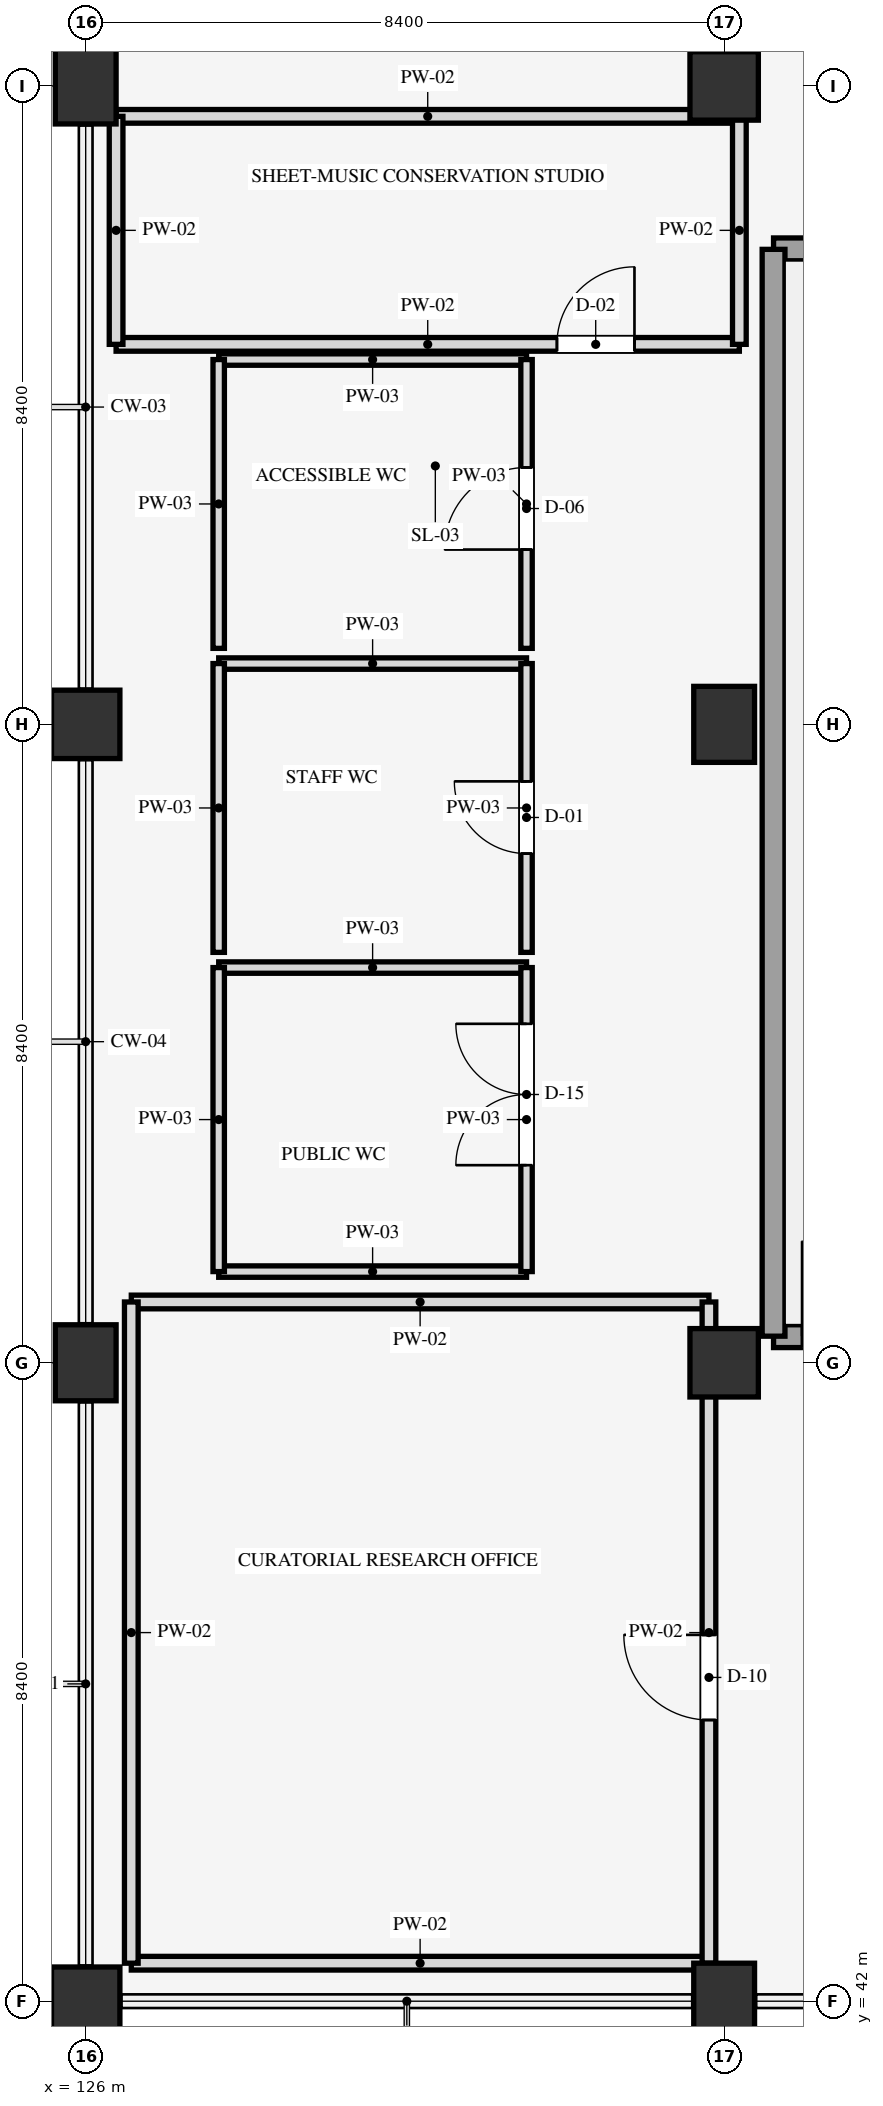
"""IFC4 building model, lengths in metres.
Left out: names, types, materials, properties, quantities, classifications, styles, units other than length and angle.
Written with IfcOpenShell. Run it as: python <this file> out.ifc"""

import sys

from ifc_helpers import new_model, si_unit, direction, frame, frame_2d, origin, origin_2d, place, context, subcontext, project, spatial, rectangle, extrude, element, fill, save


model = new_model("IFC4")
c1 = context("Model", 3, precision=1e-05, world=origin(), true_north=direction((0.0, 1.0)))
c2 = subcontext(c1, "Body", "Model", "MODEL_VIEW")
j1 = project(units=[si_unit("LENGTHUNIT", "METRE"), si_unit("PLANEANGLEUNIT", "RADIAN")], contexts=[c1])
p1 = place(None, origin())
s1 = spatial("IfcSite", under=j1, at=p1, CompositionType="ELEMENT")
p2 = place(p1, origin())
s2 = spatial("IfcBuilding", under=s1, at=p2, CompositionType="ELEMENT")
p3 = place(p2, frame((0.0, 0.0, 65.7)))
s3 = spatial("IfcBuildingStorey", under=s2, at=p3, CompositionType="ELEMENT", Elevation=65.7)
p4 = place(p3, frame((126.0, 42.0, 0.0), z_axis=(0.0, 0.0, 1.0), x_axis=(1.0, 0.0, 0.0)))
e1 = element("IfcColumn", 1, at=p4, inside=s3, PredefinedType="COLUMN", context=c2, shape_type="SweptSolid", body=[
    extrude(rectangle(XDim=0.9, YDim=0.9, at=origin_2d()), origin(), (0.0, 0.0, 1.0), 4.2),
])
p5 = place(p3, frame((126.0, 50.4, 0.0), z_axis=(0.0, 0.0, 1.0), x_axis=(1.0, 0.0, 0.0)))
e2 = element("IfcColumn", 2, at=p5, inside=s3, PredefinedType="COLUMN", context=c2, shape_type="SweptSolid", body=[
    extrude(rectangle(XDim=0.8, YDim=1.0, at=origin_2d()), origin(), (0.0, 0.0, 1.0), 4.2),
])
p6 = place(p3, frame((126.0, 58.8, 0.0), z_axis=(0.0, 0.0, 1.0), x_axis=(1.0, 0.0, 0.0)))
e3 = element("IfcColumn", 3, at=p6, inside=s3, PredefinedType="COLUMN", context=c2, shape_type="SweptSolid", body=[
    extrude(rectangle(XDim=0.9, YDim=0.9, at=origin_2d()), origin(), (0.0, 0.0, 1.0), 4.2),
])
for number, where, z_axis, x_axis in (
    (4, (126.0, 67.2, 0.0), (0.0, 0.0, 1.0), (1.0, 0.0, 0.0)),
    (5, (134.4, 42.0, 0.0), (0.0, 0.0, 1.0), (1.0, 0.0, 0.0)),
):
    element("IfcColumn", number, at=place(p3, frame(where, z_axis=z_axis, x_axis=x_axis)), inside=s3, PredefinedType="COLUMN", context=c2, shape_type="SweptSolid", body=[
        extrude(rectangle(XDim=0.8, YDim=1.0, at=origin_2d()), origin(), (0.0, 0.0, 1.0), 4.2),
    ])
p7 = place(p3, frame((134.4, 50.4, 0.0), z_axis=(0.0, 0.0, 1.0), x_axis=(1.0, 0.0, 0.0)))
e6 = element("IfcColumn", 6, at=p7, inside=s3, PredefinedType="COLUMN", context=c2, shape_type="SweptSolid", body=[
    extrude(rectangle(XDim=0.9, YDim=0.9, at=origin_2d()), origin(), (0.0, 0.0, 1.0), 4.2),
])
p8 = place(p3, frame((134.4, 58.8, 0.0), z_axis=(0.0, 0.0, 1.0), x_axis=(1.0, 0.0, 0.0)))
e7 = element("IfcColumn", 7, at=p8, inside=s3, PredefinedType="COLUMN", context=c2, shape_type="SweptSolid", body=[
    extrude(rectangle(XDim=0.8, YDim=1.0, at=origin_2d()), origin(), (0.0, 0.0, 1.0), 4.2),
])
p9 = place(p3, frame((134.4, 67.2, 0.0), z_axis=(0.0, 0.0, 1.0), x_axis=(1.0, 0.0, 0.0)))
e8 = element("IfcColumn", 8, at=p9, inside=s3, PredefinedType="COLUMN", context=c2, shape_type="SweptSolid", body=[
    extrude(rectangle(XDim=0.9, YDim=0.9, at=origin_2d()), origin(), (0.0, 0.0, 1.0), 4.2),
])
p10 = place(p3, frame((135.05, 50.75, 0.0), z_axis=(0.0, 0.0, 1.0), x_axis=(1.0, 0.0, 0.0)))
e9 = element("IfcWall", 9, at=p10, inside=s3, PredefinedType="SHEAR", context=c2, shape_type="SweptSolid", body=[
    extrude(rectangle(XDim=4.0, YDim=0.3, at=frame_2d((2.0, 0.0))), origin(), (0.0, 0.0, 1.0), 4.2),
])
p11 = place(p10, frame((0.375, 0.0, 0.0)))
e10 = element("IfcOpeningElement", 10, at=p11, cuts=e9, PredefinedType="OPENING", context=c2, shape_type="SweptSolid", body=[
    extrude(rectangle(XDim=1.25, YDim=2.15, at=frame_2d((0.625, 1.075))), frame((0.0, 0.16, 0.0), z_axis=(0.0, -1.0, 0.0), x_axis=(1.0, 0.0, 0.0)), (0.0, 0.0, 1.0), 0.32),
])
p12 = place(p3, frame((135.05, 65.05, 0.0), z_axis=(0.0, 0.0, 1.0), x_axis=(1.0, 0.0, 0.0)))
e11 = element("IfcWall", 11, at=p12, inside=s3, PredefinedType="SHEAR", context=c2, shape_type="SweptSolid", body=[
    extrude(rectangle(XDim=4.0, YDim=0.3, at=frame_2d((2.0, 0.0))), origin(), (0.0, 0.0, 1.0), 4.2),
])
p13 = place(p3, frame((135.05, 50.75, 0.0), z_axis=(0.0, 0.0, 1.0), x_axis=(0.0, 1.0, 0.0)))
e12 = element("IfcWall", 12, at=p13, inside=s3, PredefinedType="SHEAR", context=c2, shape_type="SweptSolid", body=[
    extrude(rectangle(XDim=14.3, YDim=0.3, at=frame_2d((7.15, 0.0))), origin(), (0.0, 0.0, 1.0), 4.2),
])
for number, where, z_axis, x_axis in (
    (13, (127.75, 51.6, 0.0), (0.0, 0.0, 1.0), (1.0, 0.0, 0.0)),
    (14, (127.75, 55.6, 0.0), (0.0, 0.0, 1.0), (1.0, 0.0, 0.0)),
):
    element("IfcWall", number, at=place(p3, frame(where, z_axis=z_axis, x_axis=x_axis)), inside=s3, PredefinedType="PARTITIONING", context=c2, shape_type="SweptSolid", body=[
        extrude(rectangle(XDim=4.05, YDim=0.15, at=frame_2d((2.025, 0.0))), origin(), (0.0, 0.0, 1.0), 3.24),
    ])
p14 = place(p3, frame((127.75, 51.6, 0.0), z_axis=(0.0, 0.0, 1.0), x_axis=(0.0, 1.0, 0.0)))
e15 = element("IfcWall", 15, at=p14, inside=s3, PredefinedType="PARTITIONING", context=c2, shape_type="SweptSolid", body=[
    extrude(rectangle(XDim=4.0, YDim=0.15, at=frame_2d((2.0, 0.0))), origin(), (0.0, 0.0, 1.0), 3.24),
])
p15 = place(p3, frame((131.8, 51.6, 0.0), z_axis=(0.0, 0.0, 1.0), x_axis=(0.0, 1.0, 0.0)))
e16 = element("IfcWall", 16, at=p15, inside=s3, PredefinedType="PARTITIONING", context=c2, shape_type="SweptSolid", body=[
    extrude(rectangle(XDim=4.0, YDim=0.15, at=frame_2d((2.0, 0.0))), origin(), (0.0, 0.0, 1.0), 3.24),
])
p16 = place(p15, frame((1.4, 0.0, 0.0)))
e17 = element("IfcOpeningElement", 17, at=p16, cuts=e16, PredefinedType="OPENING", context=c2, shape_type="SweptSolid", body=[
    extrude(rectangle(XDim=1.86, YDim=2.26, at=frame_2d((0.93, 1.13))), frame((0.0, 0.085, 0.0), z_axis=(0.0, -1.0, 0.0), x_axis=(1.0, 0.0, 0.0)), (0.0, 0.0, 1.0), 0.17),
])
p17 = place(p3, frame((127.75, 59.6, 0.0), z_axis=(0.0, 0.0, 1.0), x_axis=(1.0, 0.0, 0.0)))
e18 = element("IfcWall", 18, at=p17, inside=s3, PredefinedType="PARTITIONING", context=c2, shape_type="SweptSolid", body=[
    extrude(rectangle(XDim=4.05, YDim=0.15, at=frame_2d((2.025, 0.0))), origin(), (0.0, 0.0, 1.0), 3.24),
])
p18 = place(p3, frame((127.75, 55.8, 0.0), z_axis=(0.0, 0.0, 1.0), x_axis=(0.0, 1.0, 0.0)))
e19 = element("IfcWall", 19, at=p18, inside=s3, PredefinedType="PARTITIONING", context=c2, shape_type="SweptSolid", body=[
    extrude(rectangle(XDim=3.8, YDim=0.15, at=frame_2d((1.9, 0.0))), origin(), (0.0, 0.0, 1.0), 3.24),
])
p19 = place(p3, frame((131.8, 55.8, 0.0), z_axis=(0.0, 0.0, 1.0), x_axis=(0.0, 1.0, 0.0)))
e20 = element("IfcWall", 20, at=p19, inside=s3, PredefinedType="PARTITIONING", context=c2, shape_type="SweptSolid", body=[
    extrude(rectangle(XDim=3.8, YDim=0.15, at=frame_2d((1.9, 0.0))), origin(), (0.0, 0.0, 1.0), 3.24),
])
p20 = place(p19, frame((1.3, 0.0, 0.0)))
e21 = element("IfcOpeningElement", 21, at=p20, cuts=e20, PredefinedType="OPENING", context=c2, shape_type="SweptSolid", body=[
    extrude(rectangle(XDim=0.95, YDim=2.1, at=frame_2d((0.475, 1.05))), frame((0.0, 0.085, 0.0), z_axis=(0.0, -1.0, 0.0), x_axis=(1.0, 0.0, 0.0)), (0.0, 0.0, 1.0), 0.17),
])
p21 = place(p3, frame((127.75, 63.6, 0.0), z_axis=(0.0, 0.0, 1.0), x_axis=(1.0, 0.0, 0.0)))
e22 = element("IfcWall", 22, at=p21, inside=s3, PredefinedType="PARTITIONING", context=c2, shape_type="SweptSolid", body=[
    extrude(rectangle(XDim=4.05, YDim=0.15, at=frame_2d((2.025, 0.0))), origin(), (0.0, 0.0, 1.0), 3.24),
])
p22 = place(p3, frame((127.75, 59.8, 0.0), z_axis=(0.0, 0.0, 1.0), x_axis=(0.0, 1.0, 0.0)))
e23 = element("IfcWall", 23, at=p22, inside=s3, PredefinedType="PARTITIONING", context=c2, shape_type="SweptSolid", body=[
    extrude(rectangle(XDim=3.8, YDim=0.15, at=frame_2d((1.9, 0.0))), origin(), (0.0, 0.0, 1.0), 3.24),
])
p23 = place(p3, frame((131.8, 59.8, 0.0), z_axis=(0.0, 0.0, 1.0), x_axis=(0.0, 1.0, 0.0)))
e24 = element("IfcWall", 24, at=p23, inside=s3, PredefinedType="PARTITIONING", context=c2, shape_type="SweptSolid", body=[
    extrude(rectangle(XDim=3.8, YDim=0.15, at=frame_2d((1.9, 0.0))), origin(), (0.0, 0.0, 1.0), 3.24),
])
p24 = place(p23, frame((1.3, 0.0, 0.0)))
e25 = element("IfcOpeningElement", 25, at=p24, cuts=e24, PredefinedType="OPENING", context=c2, shape_type="SweptSolid", body=[
    extrude(rectangle(XDim=1.08, YDim=2.12, at=frame_2d((0.54, 1.06))), frame((0.0, 0.085, 0.0), z_axis=(0.0, -1.0, 0.0), x_axis=(1.0, 0.0, 0.0)), (0.0, 0.0, 1.0), 0.17),
])
for number, where, z_axis, x_axis in (
    (26, (126.6, 42.5, 0.0), (0.0, 0.0, 1.0), (1.0, 0.0, 0.0)),
    (27, (126.6, 51.2, 0.0), (0.0, 0.0, 1.0), (1.0, 0.0, 0.0)),
):
    element("IfcWall", number, at=place(p3, frame(where, z_axis=z_axis, x_axis=x_axis)), inside=s3, PredefinedType="PARTITIONING", context=c2, shape_type="SweptSolid", body=[
        extrude(rectangle(XDim=7.6, YDim=0.18, at=frame_2d((3.8, 0.0))), origin(), (0.0, 0.0, 1.0), 3.24),
    ])
p25 = place(p3, frame((126.6, 42.5, 0.0), z_axis=(0.0, 0.0, 1.0), x_axis=(0.0, 1.0, 0.0)))
e28 = element("IfcWall", 28, at=p25, inside=s3, PredefinedType="PARTITIONING", context=c2, shape_type="SweptSolid", body=[
    extrude(rectangle(XDim=8.7, YDim=0.18, at=frame_2d((4.35, 0.0))), origin(), (0.0, 0.0, 1.0), 3.24),
])
p26 = place(p3, frame((134.2, 42.5, 0.0), z_axis=(0.0, 0.0, 1.0), x_axis=(0.0, 1.0, 0.0)))
e29 = element("IfcWall", 29, at=p26, inside=s3, PredefinedType="PARTITIONING", context=c2, shape_type="SweptSolid", body=[
    extrude(rectangle(XDim=8.7, YDim=0.18, at=frame_2d((4.35, 0.0))), origin(), (0.0, 0.0, 1.0), 3.24),
])
p27 = place(p26, frame((3.2, 0.0, 0.0)))
e30 = element("IfcOpeningElement", 30, at=p27, cuts=e29, PredefinedType="OPENING", context=c2, shape_type="SweptSolid", body=[
    extrude(rectangle(XDim=1.12, YDim=2.14, at=frame_2d((0.56, 1.07))), frame((0.0, 0.1, 0.0), z_axis=(0.0, -1.0, 0.0), x_axis=(1.0, 0.0, 0.0)), (0.0, 0.0, 1.0), 0.2),
])
p28 = place(p3, frame((126.4, 63.8, 0.0), z_axis=(0.0, 0.0, 1.0), x_axis=(1.0, 0.0, 0.0)))
e31 = element("IfcWall", 31, at=p28, inside=s3, PredefinedType="PARTITIONING", context=c2, shape_type="SweptSolid", body=[
    extrude(rectangle(XDim=8.2, YDim=0.18, at=frame_2d((4.1, 0.0))), origin(), (0.0, 0.0, 1.0), 3.24),
])
p29 = place(p28, frame((5.8, 0.0, 0.0)))
e32 = element("IfcOpeningElement", 32, at=p29, cuts=e31, PredefinedType="OPENING", context=c2, shape_type="SweptSolid", body=[
    extrude(rectangle(XDim=1.02, YDim=2.1, at=frame_2d((0.51, 1.05))), frame((0.0, 0.1, 0.0), z_axis=(0.0, -1.0, 0.0), x_axis=(1.0, 0.0, 0.0)), (0.0, 0.0, 1.0), 0.2),
])
p30 = place(p3, frame((126.4, 66.8, 0.0), z_axis=(0.0, 0.0, 1.0), x_axis=(1.0, 0.0, 0.0)))
e33 = element("IfcWall", 33, at=p30, inside=s3, PredefinedType="PARTITIONING", context=c2, shape_type="SweptSolid", body=[
    extrude(rectangle(XDim=8.2, YDim=0.18, at=frame_2d((4.1, 0.0))), origin(), (0.0, 0.0, 1.0), 3.24),
])
for number, where, z_axis, x_axis in (
    (34, (126.4, 63.8, 0.0), (0.0, 0.0, 1.0), (0.0, 1.0, 0.0)),
    (35, (134.6, 63.8, 0.0), (0.0, 0.0, 1.0), (0.0, 1.0, 0.0)),
):
    element("IfcWall", number, at=place(p3, frame(where, z_axis=z_axis, x_axis=x_axis)), inside=s3, PredefinedType="PARTITIONING", context=c2, shape_type="SweptSolid", body=[
        extrude(rectangle(XDim=3.0, YDim=0.18, at=frame_2d((1.5, 0.0))), origin(), (0.0, 0.0, 1.0), 3.24),
    ])
p31 = place(p11, origin())
e36 = element("IfcDoor", 36, at=p31, inside=s3, OperationType="SINGLE_SWING_LEFT", PredefinedType="DOOR", context=c2, shape_type="SweptSolid", body=[
    extrude(rectangle(XDim=1.25, YDim=2.15, at=frame_2d((0.625, 1.075))), frame((0.0, 0.025, 0.0), z_axis=(0.0, -1.0, 0.0), x_axis=(1.0, 0.0, 0.0)), (0.0, 0.0, 1.0), 0.05),
])
fill(e10, e36)
p32 = place(p16, origin())
e37 = element("IfcDoor", 37, at=p32, inside=s3, OperationType="DOUBLE_DOOR_SINGLE_SWING", PredefinedType="DOOR", context=c2, shape_type="SweptSolid", body=[
    extrude(rectangle(XDim=1.86, YDim=2.26, at=frame_2d((0.93, 1.13))), frame((0.0, 0.025, 0.0), z_axis=(0.0, -1.0, 0.0), x_axis=(1.0, 0.0, 0.0)), (0.0, 0.0, 1.0), 0.05),
])
fill(e17, e37)
p33 = place(p20, origin())
e38 = element("IfcDoor", 38, at=p33, inside=s3, OperationType="SINGLE_SWING_RIGHT", PredefinedType="DOOR", context=c2, shape_type="SweptSolid", body=[
    extrude(rectangle(XDim=0.95, YDim=2.1, at=frame_2d((0.475, 1.05))), frame((0.0, 0.025, 0.0), z_axis=(0.0, -1.0, 0.0), x_axis=(1.0, 0.0, 0.0)), (0.0, 0.0, 1.0), 0.05),
])
fill(e21, e38)
p34 = place(p24, origin())
e39 = element("IfcDoor", 39, at=p34, inside=s3, OperationType="SINGLE_SWING_LEFT", PredefinedType="DOOR", context=c2, shape_type="SweptSolid", body=[
    extrude(rectangle(XDim=1.08, YDim=2.12, at=frame_2d((0.54, 1.06))), frame((0.0, 0.025, 0.0), z_axis=(0.0, -1.0, 0.0), x_axis=(1.0, 0.0, 0.0)), (0.0, 0.0, 1.0), 0.05),
])
fill(e25, e39)
p35 = place(p27, origin())
e40 = element("IfcDoor", 40, at=p35, inside=s3, OperationType="SINGLE_SWING_RIGHT", PredefinedType="DOOR", context=c2, shape_type="SweptSolid", body=[
    extrude(rectangle(XDim=1.12, YDim=2.14, at=frame_2d((0.56, 1.07))), frame((0.0, 0.025, 0.0), z_axis=(0.0, -1.0, 0.0), x_axis=(1.0, 0.0, 0.0)), (0.0, 0.0, 1.0), 0.05),
])
fill(e30, e40)
p36 = place(p29, origin())
e41 = element("IfcDoor", 41, at=p36, inside=s3, OperationType="SINGLE_SWING_RIGHT", PredefinedType="DOOR", context=c2, shape_type="SweptSolid", body=[
    extrude(rectangle(XDim=1.02, YDim=2.1, at=frame_2d((0.51, 1.05))), frame((0.0, 0.025, 0.0), z_axis=(0.0, -1.0, 0.0), x_axis=(1.0, 0.0, 0.0)), (0.0, 0.0, 1.0), 0.05),
])
fill(e32, e41)
save(model, sys.argv[1])
